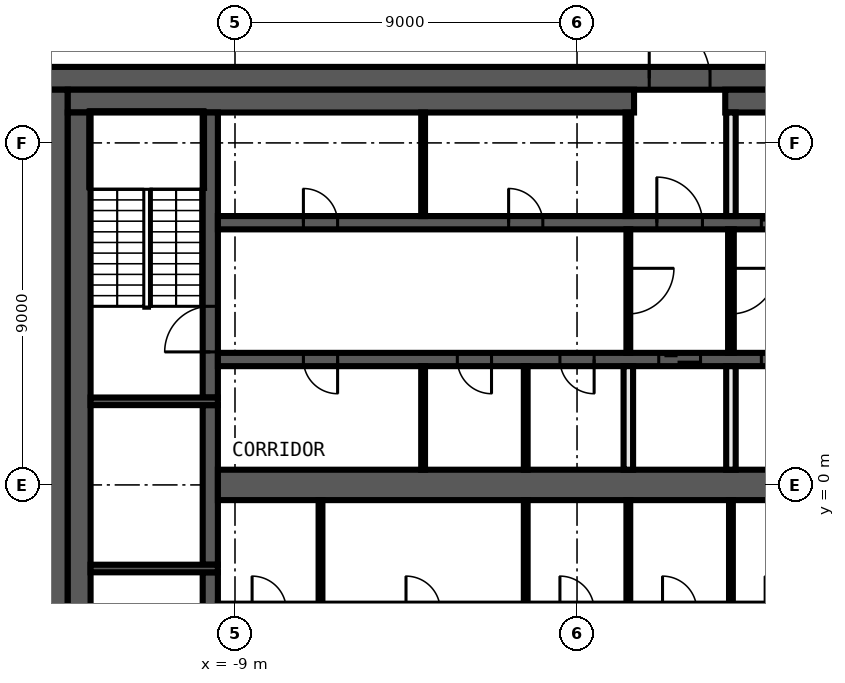
"""IFC4 building model, lengths in metres.
Left out: names, types, materials, properties, quantities, classifications, styles, units other than length and angle.
Written with IfcOpenShell. Run it as: python <this file> out.ifc"""

import sys

from ifc_helpers import new_model, si_unit, direction, frame, frame_2d, origin, place, context, subcontext, project, spatial, rectangle, extrude, element, fill, save


model = new_model("IFC4")
c1 = context("Model", 3, precision=1e-05, world=origin(), true_north=direction((0.0, 1.0)))
c2 = subcontext(c1, "Body", "Model", "MODEL_VIEW")
j1 = project(units=[si_unit("LENGTHUNIT", "METRE"), si_unit("PLANEANGLEUNIT", "RADIAN")], contexts=[c1])
p1 = place(None, origin())
s1 = spatial("IfcSite", under=j1, at=p1, CompositionType="ELEMENT")
p2 = place(p1, origin())
s2 = spatial("IfcBuilding", under=s1, at=p2, CompositionType="ELEMENT")
p3 = place(p2, frame((0.0, 0.0, 298.4)))
s3 = spatial("IfcBuildingStorey", under=s2, at=p3, CompositionType="ELEMENT", Elevation=298.4)
p4 = place(p3, frame((-14.0, 10.7, 0.0), z_axis=(0.0, 0.0, 1.0), x_axis=(1.0, 0.0, 0.0)))
e1 = element("IfcWall", 1, at=p4, inside=s3, PredefinedType="SHEAR", context=c2, shape_type="SweptSolid", body=[
    extrude(rectangle(XDim=28.0, YDim=0.6, at=frame_2d((14.0, 0.0))), origin(), (0.0, 0.0, 1.0), 3.82),
])
p5 = place(p4, frame((15.9, 0.0, 0.0)))
e2 = element("IfcOpeningElement", 2, at=p5, cuts=e1, PredefinedType="OPENING", context=c2, shape_type="SweptSolid", body=[
    extrude(rectangle(XDim=1.6, YDim=2.1, at=frame_2d((0.8, 1.05))), frame((0.0, 0.31, 0.0), z_axis=(0.0, -1.0, 0.0), x_axis=(1.0, 0.0, 0.0)), (0.0, 0.0, 1.0), 0.62),
])
p6 = place(p3, frame((-13.7, -10.4, 0.0), z_axis=(0.0, 0.0, 1.0), x_axis=(0.0, 1.0, 0.0)))
e3 = element("IfcWall", 3, at=p6, inside=s3, PredefinedType="SHEAR", context=c2, shape_type="SweptSolid", body=[
    extrude(rectangle(XDim=20.8, YDim=0.6, at=frame_2d((10.4, 0.0))), origin(), (0.0, 0.0, 1.0), 3.82),
])
p7 = place(p3, frame((-13.4, 10.1, 0.0), z_axis=(0.0, 0.0, 1.0), x_axis=(1.0, 0.0, 0.0)))
e4 = element("IfcWall", 4, at=p7, inside=s3, PredefinedType="SHEAR", context=c2, shape_type="SweptSolid", body=[
    extrude(rectangle(XDim=14.9, YDim=0.6, at=frame_2d((7.45, 0.0))), origin(), (0.0, 0.0, 1.0), 3.82),
])
p8 = place(p3, frame((3.9, 10.1, 0.0), z_axis=(0.0, 0.0, 1.0), x_axis=(1.0, 0.0, 0.0)))
e5 = element("IfcWall", 5, at=p8, inside=s3, PredefinedType="SHEAR", context=c2, shape_type="SweptSolid", body=[
    extrude(rectangle(XDim=9.5, YDim=0.6, at=frame_2d((4.75, 0.0))), origin(), (0.0, 0.0, 1.0), 3.82),
])
p9 = place(p3, frame((-13.1, -9.8, 0.0), z_axis=(0.0, 0.0, 1.0), x_axis=(0.0, 1.0, 0.0)))
e6 = element("IfcWall", 6, at=p9, inside=s3, PredefinedType="SHEAR", context=c2, shape_type="SweptSolid", body=[
    extrude(rectangle(XDim=19.6, YDim=0.6, at=frame_2d((9.8, 0.0))), origin(), (0.0, 0.0, 1.0), 3.82),
])
p10 = place(p3, frame((-9.65, -9.8, 0.0), z_axis=(0.0, 0.0, 1.0), x_axis=(0.0, 1.0, 0.0)))
e7 = element("IfcWall", 7, at=p10, inside=s3, PredefinedType="SHEAR", context=c2, shape_type="SweptSolid", body=[
    extrude(rectangle(XDim=7.5, YDim=0.4, at=frame_2d((3.75, 0.0))), origin(), (0.0, 0.0, 1.0), 3.82),
])
p11 = place(p10, frame((5.1, 0.0, 0.0)))
e8 = element("IfcOpeningElement", 8, at=p11, cuts=e7, PredefinedType="OPENING", context=c2, shape_type="SweptSolid", body=[
    extrude(rectangle(XDim=1.2, YDim=2.1, at=frame_2d((0.6, 1.05))), frame((0.0, 0.21, 0.0), z_axis=(0.0, -1.0, 0.0), x_axis=(1.0, 0.0, 0.0)), (0.0, 0.0, 1.0), 0.42),
])
p12 = place(p3, frame((-9.65, -2.1, 0.0), z_axis=(0.0, 0.0, 1.0), x_axis=(0.0, 1.0, 0.0)))
e9 = element("IfcWall", 9, at=p12, inside=s3, PredefinedType="SHEAR", context=c2, shape_type="SweptSolid", body=[
    extrude(rectangle(XDim=4.2, YDim=0.4, at=frame_2d((2.1, 0.0))), origin(), (0.0, 0.0, 1.0), 3.82),
])
p13 = place(p3, frame((-9.65, 2.3, 0.0), z_axis=(0.0, 0.0, 1.0), x_axis=(0.0, 1.0, 0.0)))
e10 = element("IfcWall", 10, at=p13, inside=s3, PredefinedType="SHEAR", context=c2, shape_type="SweptSolid", body=[
    extrude(rectangle(XDim=7.5, YDim=0.4, at=frame_2d((3.75, 0.0))), origin(), (0.0, 0.0, 1.0), 3.82),
])
p14 = place(p13, frame((1.2, 0.0, 0.0)))
e11 = element("IfcOpeningElement", 11, at=p14, cuts=e10, PredefinedType="OPENING", context=c2, shape_type="SweptSolid", body=[
    extrude(rectangle(XDim=1.2, YDim=2.1, at=frame_2d((0.6, 1.05))), frame((0.0, 0.21, 0.0), z_axis=(0.0, -1.0, 0.0), x_axis=(1.0, 0.0, 0.0)), (0.0, 0.0, 1.0), 0.42),
])
for number, where, z_axis, x_axis in (
    (12, (-9.45, 2.2, 0.0), (0.0, 0.0, 1.0), (-1.0, 0.0, 0.0)),
    (13, (-9.45, -2.2, 0.0), (0.0, 0.0, 1.0), (-1.0, 0.0, 0.0)),
):
    element("IfcWall", number, at=place(p3, frame(where, z_axis=z_axis, x_axis=x_axis)), inside=s3, PredefinedType="SHEAR", context=c2, shape_type="SweptSolid", body=[
        extrude(rectangle(XDim=3.35, YDim=0.2, at=frame_2d((1.675, 0.0))), origin(), (0.0, 0.0, 1.0), 3.82),
    ])
p15 = place(p3, frame((-9.45, 6.9, 0.0), z_axis=(0.0, 0.0, 1.0), x_axis=(1.0, 0.0, 0.0)))
e14 = element("IfcWall", 14, at=p15, inside=s3, PredefinedType="SHEAR", context=c2, shape_type="SweptSolid", body=[
    extrude(rectangle(XDim=18.9, YDim=0.35, at=frame_2d((9.45, 0.0))), origin(), (0.0, 0.0, 1.0), 3.82),
])
p16 = place(p15, frame((11.55, 0.0, 0.0)))
e15 = element("IfcOpeningElement", 15, at=p16, cuts=e14, PredefinedType="OPENING", context=c2, shape_type="SweptSolid", body=[
    extrude(rectangle(XDim=1.2, YDim=2.1, at=frame_2d((0.6, 1.05))), frame((0.0, 0.185, 0.0), z_axis=(0.0, -1.0, 0.0), x_axis=(1.0, 0.0, 0.0)), (0.0, 0.0, 1.0), 0.37),
])
p17 = place(p15, frame((14.3, 0.0, 0.0)))
e16 = element("IfcOpeningElement", 16, at=p17, cuts=e14, PredefinedType="OPENING", context=c2, shape_type="SweptSolid", body=[
    extrude(rectangle(XDim=1.1, YDim=2.1, at=frame_2d((0.55, 1.05))), frame((0.0, 0.185, 0.0), z_axis=(0.0, -1.0, 0.0), x_axis=(1.0, 0.0, 0.0)), (0.0, 0.0, 1.0), 0.37),
])
p18 = place(p15, frame((17.0, 0.0, 0.0)))
e17 = element("IfcOpeningElement", 17, at=p18, cuts=e14, PredefinedType="OPENING", context=c2, shape_type="SweptSolid", body=[
    extrude(rectangle(XDim=1.1, YDim=2.1, at=frame_2d((0.55, 1.05))), frame((0.0, 0.185, 0.0), z_axis=(0.0, -1.0, 0.0), x_axis=(1.0, 0.0, 0.0)), (0.0, 0.0, 1.0), 0.37),
])
p19 = place(p15, frame((2.25, 0.0, 0.0)))
e18 = element("IfcOpeningElement", 18, at=p19, cuts=e14, PredefinedType="OPENING", context=c2, shape_type="SweptSolid", body=[
    extrude(rectangle(XDim=0.9, YDim=2.1, at=frame_2d((0.45, 1.05))), frame((0.0, 0.185, 0.0), z_axis=(0.0, -1.0, 0.0), x_axis=(1.0, 0.0, 0.0)), (0.0, 0.0, 1.0), 0.37),
])
p20 = place(p15, frame((7.65, 0.0, 0.0)))
e19 = element("IfcOpeningElement", 19, at=p20, cuts=e14, PredefinedType="OPENING", context=c2, shape_type="SweptSolid", body=[
    extrude(rectangle(XDim=0.9, YDim=2.1, at=frame_2d((0.45, 1.05))), frame((0.0, 0.185, 0.0), z_axis=(0.0, -1.0, 0.0), x_axis=(1.0, 0.0, 0.0)), (0.0, 0.0, 1.0), 0.37),
])
p21 = place(p3, frame((9.45, 3.3, 0.0), z_axis=(0.0, 0.0, 1.0), x_axis=(-1.0, 0.0, 0.0)))
e20 = element("IfcWall", 20, at=p21, inside=s3, PredefinedType="SHEAR", context=c2, shape_type="SweptSolid", body=[
    extrude(rectangle(XDim=18.9, YDim=0.35, at=frame_2d((9.45, 0.0))), origin(), (0.0, 0.0, 1.0), 3.82),
])
p22 = place(p21, frame((6.2, 0.0, 0.0)))
e21 = element("IfcOpeningElement", 21, at=p22, cuts=e20, PredefinedType="OPENING", context=c2, shape_type="SweptSolid", body=[
    extrude(rectangle(XDim=1.1, YDim=2.1, at=frame_2d((0.55, 1.05))), frame((0.0, 0.185, 0.0), z_axis=(0.0, -1.0, 0.0), x_axis=(1.0, 0.0, 0.0)), (0.0, 0.0, 1.0), 0.37),
])
p23 = place(p21, frame((3.5, 0.0, 0.0)))
e22 = element("IfcOpeningElement", 22, at=p23, cuts=e20, PredefinedType="OPENING", context=c2, shape_type="SweptSolid", body=[
    extrude(rectangle(XDim=1.1, YDim=2.1, at=frame_2d((0.55, 1.05))), frame((0.0, 0.185, 0.0), z_axis=(0.0, -1.0, 0.0), x_axis=(1.0, 0.0, 0.0)), (0.0, 0.0, 1.0), 0.37),
])
p24 = place(p21, frame((0.9, 0.0, 0.0)))
e23 = element("IfcOpeningElement", 23, at=p24, cuts=e20, PredefinedType="OPENING", context=c2, shape_type="SweptSolid", body=[
    extrude(rectangle(XDim=0.9, YDim=2.1, at=frame_2d((0.45, 1.05))), frame((0.0, 0.185, 0.0), z_axis=(0.0, -1.0, 0.0), x_axis=(1.0, 0.0, 0.0)), (0.0, 0.0, 1.0), 0.37),
])
p25 = place(p21, frame((15.75, 0.0, 0.0)))
e24 = element("IfcOpeningElement", 24, at=p25, cuts=e20, PredefinedType="OPENING", context=c2, shape_type="SweptSolid", body=[
    extrude(rectangle(XDim=0.9, YDim=2.1, at=frame_2d((0.45, 1.05))), frame((0.0, 0.185, 0.0), z_axis=(0.0, -1.0, 0.0), x_axis=(1.0, 0.0, 0.0)), (0.0, 0.0, 1.0), 0.37),
])
p26 = place(p21, frame((11.7, 0.0, 0.0)))
e25 = element("IfcOpeningElement", 25, at=p26, cuts=e20, PredefinedType="OPENING", context=c2, shape_type="SweptSolid", body=[
    extrude(rectangle(XDim=0.9, YDim=2.1, at=frame_2d((0.45, 1.05))), frame((0.0, 0.185, 0.0), z_axis=(0.0, -1.0, 0.0), x_axis=(1.0, 0.0, 0.0)), (0.0, 0.0, 1.0), 0.37),
])
p27 = place(p21, frame((9.0, 0.0, 0.0)))
e26 = element("IfcOpeningElement", 26, at=p27, cuts=e20, PredefinedType="OPENING", context=c2, shape_type="SweptSolid", body=[
    extrude(rectangle(XDim=0.9, YDim=2.1, at=frame_2d((0.45, 1.05))), frame((0.0, 0.185, 0.0), z_axis=(0.0, -1.0, 0.0), x_axis=(1.0, 0.0, 0.0)), (0.0, 0.0, 1.0), 0.37),
])
p28 = place(p3, frame((-9.45, 0.0, 0.0), z_axis=(0.0, 0.0, 1.0), x_axis=(1.0, 0.0, 0.0)))
e27 = element("IfcWall", 27, at=p28, inside=s3, PredefinedType="SHEAR", context=c2, shape_type="SweptSolid", body=[
    extrude(rectangle(XDim=18.9, YDim=0.8, at=frame_2d((9.45, 0.0))), origin(), (0.0, 0.0, 1.0), 3.82),
])
p29 = place(p3, frame((4.05, 6.725, 0.0), z_axis=(0.0, 0.0, 1.0), x_axis=(0.0, -1.0, 0.0)))
e28 = element("IfcWall", 28, at=p29, inside=s3, PredefinedType="PARTITIONING", context=c2, shape_type="SweptSolid", body=[
    extrude(rectangle(XDim=3.25, YDim=0.15, at=frame_2d((1.625, 0.0))), origin(), (0.0, 0.0, 1.0), 3.82),
])
p30 = place(p29, frame((1.025, 0.0, 0.0)))
e29 = element("IfcOpeningElement", 29, at=p30, cuts=e28, PredefinedType="OPENING", context=c2, shape_type="SweptSolid", body=[
    extrude(rectangle(XDim=1.2, YDim=2.1, at=frame_2d((0.6, 1.05))), frame((0.0, 0.085, 0.0), z_axis=(0.0, -1.0, 0.0), x_axis=(1.0, 0.0, 0.0)), (0.0, 0.0, 1.0), 0.17),
])
p31 = place(p3, frame((4.05, -3.125, 0.0), z_axis=(0.0, 0.0, 1.0), x_axis=(0.0, 1.0, 0.0)))
e30 = element("IfcWall", 30, at=p31, inside=s3, PredefinedType="PARTITIONING", context=c2, shape_type="SweptSolid", body=[
    extrude(rectangle(XDim=2.725, YDim=0.1, at=frame_2d((1.363, 0.0))), origin(), (0.0, 0.0, 1.0), 3.82),
])
for number, where, z_axis, x_axis in (
    (31, (4.05, 0.4, 0.0), (0.0, 0.0, 1.0), (0.0, 1.0, 0.0)),
    (32, (4.05, 7.075, 0.0), (0.0, 0.0, 1.0), (0.0, 1.0, 0.0)),
):
    element("IfcWall", number, at=place(p3, frame(where, z_axis=z_axis, x_axis=x_axis)), inside=s3, PredefinedType="SOLIDWALL", context=c2, shape_type="SweptSolid", body=[
        extrude(rectangle(XDim=2.725, YDim=0.25, at=frame_2d((1.363, 0.0))), origin(), (0.0, 0.0, 1.0), 3.82),
    ])
p32 = place(p3, frame((1.35, 7.075, 0.0), z_axis=(0.0, 0.0, 1.0), x_axis=(0.0, 1.0, 0.0)))
e33 = element("IfcWall", 33, at=p32, inside=s3, PredefinedType="PARTITIONING", context=c2, shape_type="SweptSolid", body=[
    extrude(rectangle(XDim=2.725, YDim=0.15, at=frame_2d((1.363, 0.0))), origin(), (0.0, 0.0, 1.0), 3.82),
])
p33 = place(p3, frame((1.35, -3.125, 0.0), z_axis=(0.0, 0.0, 1.0), x_axis=(0.0, 1.0, 0.0)))
e34 = element("IfcWall", 34, at=p33, inside=s3, PredefinedType="PARTITIONING", context=c2, shape_type="SweptSolid", body=[
    extrude(rectangle(XDim=2.725, YDim=0.1, at=frame_2d((1.363, 0.0))), origin(), (0.0, 0.0, 1.0), 3.82),
])
p34 = place(p3, frame((1.35, 6.725, 0.0), z_axis=(0.0, 0.0, 1.0), x_axis=(0.0, -1.0, 0.0)))
e35 = element("IfcWall", 35, at=p34, inside=s3, PredefinedType="PARTITIONING", context=c2, shape_type="SweptSolid", body=[
    extrude(rectangle(XDim=3.25, YDim=0.1, at=frame_2d((1.625, 0.0))), origin(), (0.0, 0.0, 1.0), 3.82),
])
p35 = place(p34, frame((1.025, 0.0, 0.0)))
e36 = element("IfcOpeningElement", 36, at=p35, cuts=e35, PredefinedType="OPENING", context=c2, shape_type="SweptSolid", body=[
    extrude(rectangle(XDim=1.2, YDim=2.1, at=frame_2d((0.6, 1.05))), frame((0.0, 0.06, 0.0), z_axis=(0.0, -1.0, 0.0), x_axis=(1.0, 0.0, 0.0)), (0.0, 0.0, 1.0), 0.12),
])
p36 = place(p3, frame((1.35, 0.4, 0.0), z_axis=(0.0, 0.0, 1.0), x_axis=(0.0, 1.0, 0.0)))
e37 = element("IfcWall", 37, at=p36, inside=s3, PredefinedType="SOLIDWALL", context=c2, shape_type="SweptSolid", body=[
    extrude(rectangle(XDim=2.725, YDim=0.25, at=frame_2d((1.363, 0.0))), origin(), (0.0, 0.0, 1.0), 3.82),
])
for number, where, z_axis, x_axis in (
    (38, (-1.35, -3.125, 0.0), (0.0, 0.0, 1.0), (0.0, 1.0, 0.0)),
    (39, (-1.35, 0.4, 0.0), (0.0, 0.0, 1.0), (0.0, 1.0, 0.0)),
    (40, (-4.05, 0.4, 0.0), (0.0, 0.0, 1.0), (0.0, 1.0, 0.0)),
    (41, (-4.05, 7.075, 0.0), (0.0, 0.0, 1.0), (0.0, 1.0, 0.0)),
    (42, (-6.75, -3.125, 0.0), (0.0, 0.0, 1.0), (0.0, 1.0, 0.0)),
):
    element("IfcWall", number, at=place(p3, frame(where, z_axis=z_axis, x_axis=x_axis)), inside=s3, PredefinedType="PARTITIONING", context=c2, shape_type="SweptSolid", body=[
        extrude(rectangle(XDim=2.725, YDim=0.1, at=frame_2d((1.363, 0.0))), origin(), (0.0, 0.0, 1.0), 3.82),
    ])
p37 = place(p5, origin())
e43 = element("IfcDoor", 43, at=p37, inside=s3, OperationType="DOUBLE_DOOR_SINGLE_SWING", PredefinedType="DOOR", context=c2, shape_type="SweptSolid", body=[
    extrude(rectangle(XDim=1.6, YDim=2.1, at=frame_2d((0.8, 1.05))), frame((0.0, 0.025, 0.0), z_axis=(0.0, -1.0, 0.0), x_axis=(1.0, 0.0, 0.0)), (0.0, 0.0, 1.0), 0.05),
])
fill(e2, e43)
p38 = place(p16, origin())
e44 = element("IfcDoor", 44, at=p38, inside=s3, OperationType="SINGLE_SWING_LEFT", PredefinedType="DOOR", context=c2, shape_type="SweptSolid", body=[
    extrude(rectangle(XDim=1.2, YDim=2.1, at=frame_2d((0.6, 1.05))), frame((0.0, 0.025, 0.0), z_axis=(0.0, -1.0, 0.0), x_axis=(1.0, 0.0, 0.0)), (0.0, 0.0, 1.0), 0.05),
])
fill(e15, e44)
p39 = place(p17, origin())
e45 = element("IfcDoor", 45, at=p39, inside=s3, OperationType="DOUBLE_DOOR_SLIDING", PredefinedType="DOOR", context=c2, shape_type="SweptSolid", body=[
    extrude(rectangle(XDim=1.1, YDim=2.1, at=frame_2d((0.55, 1.05))), frame((0.0, 0.025, 0.0), z_axis=(0.0, -1.0, 0.0), x_axis=(1.0, 0.0, 0.0)), (0.0, 0.0, 1.0), 0.05),
])
fill(e16, e45)
p40 = place(p22, origin())
e46 = element("IfcDoor", 46, at=p40, inside=s3, OperationType="DOUBLE_DOOR_SLIDING", PredefinedType="DOOR", context=c2, shape_type="SweptSolid", body=[
    extrude(rectangle(XDim=1.1, YDim=2.1, at=frame_2d((0.55, 1.05))), frame((0.0, 0.025, 0.0), z_axis=(0.0, -1.0, 0.0), x_axis=(1.0, 0.0, 0.0)), (0.0, 0.0, 1.0), 0.05),
])
fill(e21, e46)
p41 = place(p23, origin())
e47 = element("IfcDoor", 47, at=p41, inside=s3, OperationType="DOUBLE_DOOR_SLIDING", PredefinedType="DOOR", context=c2, shape_type="SweptSolid", body=[
    extrude(rectangle(XDim=1.1, YDim=2.1, at=frame_2d((0.55, 1.05))), frame((0.0, 0.025, 0.0), z_axis=(0.0, -1.0, 0.0), x_axis=(1.0, 0.0, 0.0)), (0.0, 0.0, 1.0), 0.05),
])
fill(e22, e47)
p42 = place(p19, origin())
e48 = element("IfcDoor", 48, at=p42, inside=s3, OperationType="SINGLE_SWING_RIGHT", PredefinedType="DOOR", context=c2, shape_type="SweptSolid", body=[
    extrude(rectangle(XDim=0.9, YDim=2.1, at=frame_2d((0.45, 1.05))), frame((0.0, 0.025, 0.0), z_axis=(0.0, -1.0, 0.0), x_axis=(1.0, 0.0, 0.0)), (0.0, 0.0, 1.0), 0.05),
])
fill(e18, e48)
p43 = place(p20, origin())
e49 = element("IfcDoor", 49, at=p43, inside=s3, OperationType="SINGLE_SWING_LEFT", PredefinedType="DOOR", context=c2, shape_type="SweptSolid", body=[
    extrude(rectangle(XDim=0.9, YDim=2.1, at=frame_2d((0.45, 1.05))), frame((0.0, 0.025, 0.0), z_axis=(0.0, -1.0, 0.0), x_axis=(1.0, 0.0, 0.0)), (0.0, 0.0, 1.0), 0.05),
])
fill(e19, e49)
p44 = place(p25, origin())
e50 = element("IfcDoor", 50, at=p44, inside=s3, OperationType="SINGLE_SWING_RIGHT", PredefinedType="DOOR", context=c2, shape_type="SweptSolid", body=[
    extrude(rectangle(XDim=0.9, YDim=2.1, at=frame_2d((0.45, 1.05))), frame((0.0, 0.025, 0.0), z_axis=(0.0, -1.0, 0.0), x_axis=(1.0, 0.0, 0.0)), (0.0, 0.0, 1.0), 0.05),
])
fill(e24, e50)
p45 = place(p26, origin())
e51 = element("IfcDoor", 51, at=p45, inside=s3, OperationType="SINGLE_SWING_LEFT", PredefinedType="DOOR", context=c2, shape_type="SweptSolid", body=[
    extrude(rectangle(XDim=0.9, YDim=2.1, at=frame_2d((0.45, 1.05))), frame((0.0, 0.025, 0.0), z_axis=(0.0, -1.0, 0.0), x_axis=(1.0, 0.0, 0.0)), (0.0, 0.0, 1.0), 0.05),
])
fill(e25, e51)
p46 = place(p27, origin())
e52 = element("IfcDoor", 52, at=p46, inside=s3, OperationType="SINGLE_SWING_RIGHT", PredefinedType="DOOR", context=c2, shape_type="SweptSolid", body=[
    extrude(rectangle(XDim=0.9, YDim=2.1, at=frame_2d((0.45, 1.05))), frame((0.0, 0.025, 0.0), z_axis=(0.0, -1.0, 0.0), x_axis=(1.0, 0.0, 0.0)), (0.0, 0.0, 1.0), 0.05),
])
fill(e26, e52)
p47 = place(p14, origin())
e53 = element("IfcDoor", 53, at=p47, inside=s3, OperationType="SINGLE_SWING_RIGHT", PredefinedType="DOOR", context=c2, shape_type="SweptSolid", body=[
    extrude(rectangle(XDim=1.2, YDim=2.1, at=frame_2d((0.6, 1.05))), frame((0.0, 0.025, 0.0), z_axis=(0.0, -1.0, 0.0), x_axis=(1.0, 0.0, 0.0)), (0.0, 0.0, 1.0), 0.05),
])
fill(e11, e53)
p48 = place(p35, origin())
e54 = element("IfcDoor", 54, at=p48, inside=s3, OperationType="SINGLE_SWING_LEFT", PredefinedType="DOOR", context=c2, shape_type="SweptSolid", body=[
    extrude(rectangle(XDim=1.2, YDim=2.1, at=frame_2d((0.6, 1.05))), frame((0.0, 0.025, 0.0), z_axis=(0.0, -1.0, 0.0), x_axis=(1.0, 0.0, 0.0)), (0.0, 0.0, 1.0), 0.05),
])
fill(e36, e54)
p49 = place(p30, origin())
e55 = element("IfcDoor", 55, at=p49, inside=s3, OperationType="SINGLE_SWING_RIGHT", PredefinedType="DOOR", context=c2, shape_type="SweptSolid", body=[
    extrude(rectangle(XDim=1.2, YDim=2.1, at=frame_2d((0.6, 1.05))), frame((0.0, 0.025, 0.0), z_axis=(0.0, -1.0, 0.0), x_axis=(1.0, 0.0, 0.0)), (0.0, 0.0, 1.0), 0.05),
])
fill(e29, e55)
save(model, sys.argv[1])
